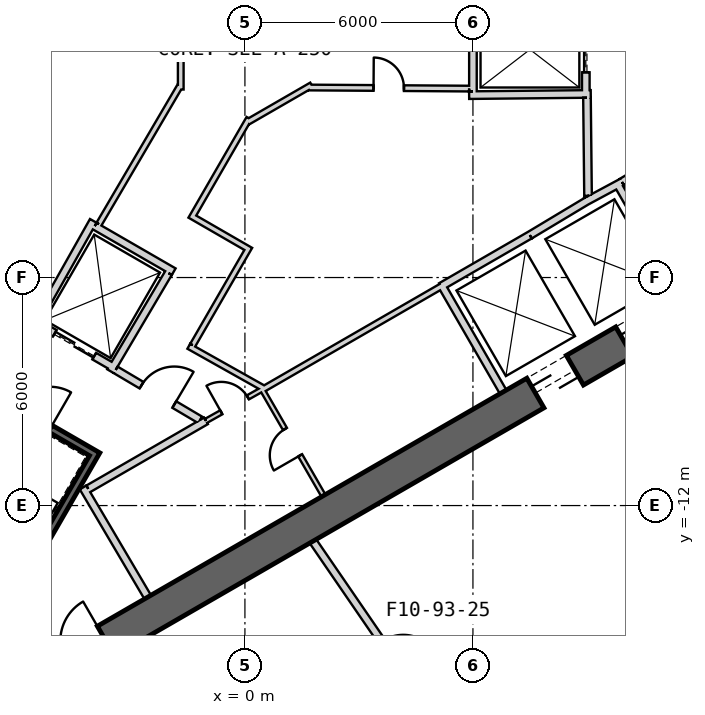
"""IFC4 building model, lengths in metres.
Left out: names, types, materials, properties, quantities, classifications, styles, units other than length and angle.
Written with IfcOpenShell. Run it as: python <this file> out.ifc"""

import sys

from ifc_helpers import new_model, si_unit, direction, frame, frame_2d, origin, place, context, subcontext, project, spatial, rectangle, extrude, element, fill, save


model = new_model("IFC4")
c1 = context("Model", 3, precision=1e-05, world=origin(), true_north=direction((0.0, 1.0)))
c2 = subcontext(c1, "Body", "Model", "MODEL_VIEW")
j1 = project(units=[si_unit("LENGTHUNIT", "METRE"), si_unit("PLANEANGLEUNIT", "RADIAN")], contexts=[c1])
p1 = place(None, origin())
s1 = spatial("IfcSite", under=j1, at=p1, CompositionType="ELEMENT")
p2 = place(p1, origin())
s2 = spatial("IfcBuilding", under=s1, at=p2, CompositionType="ELEMENT")
p3 = place(p2, frame((0.0, 0.0, 410.3)))
s3 = spatial("IfcBuildingStorey", under=s2, at=p3, CompositionType="ELEMENT", Elevation=410.3)
p4 = place(p3, frame((-7.825, -17.97, 0.0), z_axis=(0.0, 0.0, 1.0), x_axis=(0.866028369851, 0.499994862586, 0.0)))
e1 = element("IfcWall", 1, at=p4, inside=s3, PredefinedType="SHEAR", context=c2, shape_type="SweptSolid", body=[
    extrude(rectangle(XDim=31.523, YDim=0.9, at=frame_2d((15.762, 0.0))), origin(), (0.0, 0.0, 1.0), 5.0),
])
p5 = place(p4, frame((17.862, 0.0, 0.0)))
e2 = element("IfcOpeningElement", 2, at=p5, cuts=e1, PredefinedType="OPENING", context=c2, shape_type="SweptSolid", body=[
    extrude(rectangle(XDim=1.2, YDim=2.4, at=frame_2d((0.6, 1.2))), frame((0.0, 0.46, 0.0), z_axis=(0.0, -1.0, 0.0), x_axis=(1.0, 0.0, 0.0)), (0.0, 0.0, 1.0), 0.92),
])
p6 = place(p4, frame((20.562, 0.0, 0.0)))
e3 = element("IfcOpeningElement", 3, at=p6, cuts=e1, PredefinedType="OPENING", context=c2, shape_type="SweptSolid", body=[
    extrude(rectangle(XDim=1.2, YDim=2.4, at=frame_2d((0.6, 1.2))), frame((0.0, 0.46, 0.0), z_axis=(0.0, -1.0, 0.0), x_axis=(1.0, 0.0, 0.0)), (0.0, 0.0, 1.0), 0.92),
])
p7 = place(p4, frame((26.712, 0.0, 0.0)))
e4 = element("IfcOpeningElement", 4, at=p7, cuts=e1, PredefinedType="OPENING", context=c2, shape_type="SweptSolid", body=[
    extrude(rectangle(XDim=1.2, YDim=2.4, at=frame_2d((0.6, 1.2))), frame((0.0, 0.46, 0.0), z_axis=(0.0, -1.0, 0.0), x_axis=(1.0, 0.0, 0.0)), (0.0, 0.0, 1.0), 0.92),
])
p8 = place(p4, frame((3.612, 0.0, 0.0)))
e5 = element("IfcOpeningElement", 5, at=p8, cuts=e1, PredefinedType="OPENING", context=c2, shape_type="SweptSolid", body=[
    extrude(rectangle(XDim=1.2, YDim=2.4, at=frame_2d((0.6, 1.2))), frame((0.0, 0.46, 0.0), z_axis=(0.0, -1.0, 0.0), x_axis=(1.0, 0.0, 0.0)), (0.0, 0.0, 1.0), 0.92),
])
p9 = place(p3, frame((-1.186, -23.926, 0.0), z_axis=(0.0, 0.0, 1.0), x_axis=(0.824480875731, 0.565889817503, 0.0)))
e6 = element("IfcWall", 6, at=p9, inside=s3, PredefinedType="SOLIDWALL", context=c2, shape_type="SweptSolid", body=[
    extrude(rectangle(XDim=26.064, YDim=0.24, at=frame_2d((13.032, 0.0))), origin(), (0.0, 0.0, 1.0), 4.75),
])
p10 = place(p3, frame((21.34, -9.818, 0.04), z_axis=(0.0, 0.0, 1.0), x_axis=(-0.82447788812, -0.565894170319, 0.0)))
e7 = element("IfcWall", 7, at=p10, inside=s3, PredefinedType="PARAPET", context=c2, shape_type="SweptSolid", body=[
    extrude(rectangle(XDim=27.207, YDim=0.25, at=frame_2d((13.603, 0.0))), origin(), (0.0, 0.0, 1.0), 1.2),
])
p11 = place(p3, frame((20.588, -9.667, 0.04), z_axis=(0.0, 0.0, 1.0), x_axis=(-0.824474055668, -0.565899753958, 0.0)))
e8 = element("IfcWall", 8, at=p11, inside=s3, PredefinedType="PARAPET", context=c2, shape_type="SweptSolid", body=[
    extrude(rectangle(XDim=26.031, YDim=0.5, at=frame_2d((13.016, 0.0))), origin(), (0.0, 0.0, 1.0), 0.6),
])
p12 = place(p3, frame((6.795, -9.01, 0.0), z_axis=(0.0, 0.0, 1.0), x_axis=(-0.499984717929, 0.866034226713, 0.0)))
e9 = element("IfcWall", 9, at=p12, inside=s3, PredefinedType="PLUMBINGWALL", context=c2, shape_type="SweptSolid", body=[
    extrude(rectangle(XDim=3.25, YDim=0.2, at=frame_2d((1.625, 0.0))), origin(), (0.0, 0.0, 1.0), 4.75),
])
p13 = place(p3, frame((5.159, -6.236, 0.0), z_axis=(0.0, 0.0, 1.0), x_axis=(0.866036505625, 0.499980770555, 0.0)))
e10 = element("IfcWall", 10, at=p13, inside=s3, PredefinedType="PLUMBINGWALL", context=c2, shape_type="SweptSolid", body=[
    extrude(rectangle(XDim=2.7, YDim=0.2, at=frame_2d((1.35, 0.0))), origin(), (0.0, 0.0, 1.0), 4.75),
])
p14 = place(p3, frame((9.795, -3.525, 0.0), z_axis=(0.0, 0.0, 1.0), x_axis=(0.499984717929, -0.866034226713, 0.0)))
e11 = element("IfcWall", 11, at=p14, inside=s3, PredefinedType="PLUMBINGWALL", context=c2, shape_type="SweptSolid", body=[
    extrude(rectangle(XDim=3.25, YDim=0.2, at=frame_2d((1.625, 0.0))), origin(), (0.0, 0.0, 1.0), 4.75),
])
p15 = place(p3, frame((8.974, -3.999, 0.0), z_axis=(0.0, 0.0, 1.0), x_axis=(0.880907015104, 0.473289373154, 0.0)))
e12 = element("IfcWall", 12, at=p15, inside=s3, PredefinedType="PLUMBINGWALL", context=c2, shape_type="SweptSolid", body=[
    extrude(rectangle(XDim=1.078, YDim=0.2, at=frame_2d((0.539, 0.0))), origin(), (0.0, 0.0, 1.0), 4.75),
])
p16 = place(p3, frame((7.497, -4.886, 0.0), z_axis=(0.0, 0.0, 1.0), x_axis=(0.857516281273, 0.51445682749, 0.0)))
e13 = element("IfcWall", 13, at=p16, inside=s3, PredefinedType="PLUMBINGWALL", context=c2, shape_type="SweptSolid", body=[
    extrude(rectangle(XDim=1.845, YDim=0.2, at=frame_2d((0.922, 0.0))), origin(), (0.0, 0.0, 1.0), 4.75),
])
p17 = place(p3, frame((8.97, 1.2, 0.0), z_axis=(0.0, 0.0, 1.0), x_axis=(0.0, -1.0, 0.0)))
e14 = element("IfcWall", 14, at=p17, inside=s3, PredefinedType="PLUMBINGWALL", context=c2, shape_type="SweptSolid", body=[
    extrude(rectangle(XDim=2.4, YDim=0.2, at=frame_2d((1.2, 0.0))), origin(), (0.0, 0.0, 1.0), 4.75),
])
p18 = place(p17, frame((0.6, 0.0, 0.0)))
e15 = element("IfcOpeningElement", 15, at=p18, cuts=e14, PredefinedType="OPENING", context=c2, shape_type="SweptSolid", body=[
    extrude(rectangle(XDim=1.2, YDim=2.4, at=frame_2d((0.6, 1.2))), frame((0.0, 0.11, 0.0), z_axis=(0.0, -1.0, 0.0), x_axis=(1.0, 0.0, 0.0)), (0.0, 0.0, 1.0), 0.22),
])
p19 = place(p3, frame((9.1, -1.169, 0.0), z_axis=(0.0, 0.0, 1.0), x_axis=(-0.999950064753, -0.009993397809, 0.0)))
e16 = element("IfcWall", 16, at=p19, inside=s3, PredefinedType="PLUMBINGWALL", context=c2, shape_type="SweptSolid", body=[
    extrude(rectangle(XDim=3.2, YDim=0.2, at=frame_2d((1.6, 0.0))), origin(), (0.0, 0.0, 1.0), 4.75),
])
p20 = place(p3, frame((6.0, -1.1, 0.0), z_axis=(0.0, 0.0, 1.0), x_axis=(0.0, 1.0, 0.0)))
e17 = element("IfcWall", 17, at=p20, inside=s3, PredefinedType="PLUMBINGWALL", context=c2, shape_type="SweptSolid", body=[
    extrude(rectangle(XDim=2.4, YDim=0.2, at=frame_2d((1.2, 0.0))), origin(), (0.0, 0.0, 1.0), 4.75),
])
p21 = place(p3, frame((-3.905, -10.563, -0.25), z_axis=(0.0, 0.0, 1.0), x_axis=(-0.500012932018, -0.866017937352, 0.0)))
e18 = element("IfcWall", 18, at=p21, inside=s3, PredefinedType="SHEAR", context=c2, shape_type="SweptSolid", body=[
    extrude(rectangle(XDim=8.1, YDim=0.2, at=frame_2d((4.05, 0.0))), origin(), (0.0, 0.0, 1.0), 5.0),
])
p22 = place(p3, frame((-4.041, -10.599, -0.25), z_axis=(0.0, 0.0, 1.0), x_axis=(-0.866047807691, 0.499961193289, 0.0)))
e19 = element("IfcWall", 19, at=p22, inside=s3, PredefinedType="SHEAR", context=c2, shape_type="SweptSolid", body=[
    extrude(rectangle(XDim=3.6, YDim=0.2, at=frame_2d((1.8, 0.0))), origin(), (0.0, 0.0, 1.0), 5.0),
])
p23 = place(p22, frame((1.25, 0.0, 0.25)))
e20 = element("IfcOpeningElement", 20, at=p23, cuts=e19, PredefinedType="OPENING", context=c2, shape_type="SweptSolid", body=[
    extrude(rectangle(XDim=1.1, YDim=2.1, at=frame_2d((0.55, 1.05))), frame((0.0, 0.11, 0.0), z_axis=(0.0, -1.0, 0.0), x_axis=(1.0, 0.0, 0.0)), (0.0, 0.0, 1.0), 0.22),
])
p24 = place(p3, frame((-3.446, -8.368, 0.0), z_axis=(0.0, 0.0, 1.0), x_axis=(-0.866024647952, 0.500001309137, 0.0)))
e21 = element("IfcWall", 21, at=p24, inside=s3, PredefinedType="PLUMBINGWALL", context=c2, shape_type="SweptSolid", body=[
    extrude(rectangle(XDim=2.4, YDim=0.2, at=frame_2d((1.2, 0.0))), origin(), (0.0, 0.0, 1.0), 4.75),
])
p25 = place(p24, frame((0.6, 0.0, 0.0)))
e22 = element("IfcOpeningElement", 22, at=p25, cuts=e21, PredefinedType="OPENING", context=c2, shape_type="SweptSolid", body=[
    extrude(rectangle(XDim=1.2, YDim=2.4, at=frame_2d((0.6, 1.2))), frame((0.0, 0.11, 0.0), z_axis=(0.0, -1.0, 0.0), x_axis=(1.0, 0.0, 0.0)), (0.0, 0.0, 1.0), 0.22),
])
p26 = place(p3, frame((-5.562, -7.296, 0.0), z_axis=(0.0, 0.0, 1.0), x_axis=(0.491358283181, 0.870957540612, 0.0)))
e23 = element("IfcWall", 23, at=p26, inside=s3, PredefinedType="PLUMBINGWALL", context=c2, shape_type="SweptSolid", body=[
    extrude(rectangle(XDim=3.2, YDim=0.2, at=frame_2d((1.6, 0.0))), origin(), (0.0, 0.0, 1.0), 4.75),
])
p27 = place(p3, frame((-3.953, -4.646, 0.0), z_axis=(0.0, 0.0, 1.0), x_axis=(0.866024647952, -0.500001309137, 0.0)))
e24 = element("IfcWall", 24, at=p27, inside=s3, PredefinedType="PLUMBINGWALL", context=c2, shape_type="SweptSolid", body=[
    extrude(rectangle(XDim=2.4, YDim=0.2, at=frame_2d((1.2, 0.0))), origin(), (0.0, 0.0, 1.0), 4.75),
])
p28 = place(p3, frame((-2.012, -5.882, 0.0), z_axis=(0.0, 0.0, 1.0), x_axis=(-0.508619639323, -0.860991325447, 0.0)))
e25 = element("IfcWall", 25, at=p28, inside=s3, PredefinedType="PLUMBINGWALL", context=c2, shape_type="SweptSolid", body=[
    extrude(rectangle(XDim=3.0, YDim=0.2, at=frame_2d((1.5, 0.0))), origin(), (0.0, 0.0, 1.0), 4.75),
])
p29 = place(p3, frame((2.067, -11.74, 0.0), z_axis=(0.0, 0.0, 1.0), x_axis=(-0.499984717929, 0.866034226713, 0.0)))
e26 = element("IfcWall", 26, at=p29, inside=s3, PredefinedType="PARTITIONING", context=c2, shape_type="SweptSolid", body=[
    extrude(rectangle(XDim=3.25, YDim=0.12, at=frame_2d((1.625, 0.0))), origin(), (0.0, 0.0, 1.0), 4.75),
])
p30 = place(p29, frame((1.225, 0.0, 0.0)))
e27 = element("IfcOpeningElement", 27, at=p30, cuts=e26, PredefinedType="OPENING", context=c2, shape_type="SweptSolid", body=[
    extrude(rectangle(XDim=0.8, YDim=2.1, at=frame_2d((0.4, 1.05))), frame((0.0, 0.07, 0.0), z_axis=(0.0, -1.0, 0.0), x_axis=(1.0, 0.0, 0.0)), (0.0, 0.0, 1.0), 0.14),
])
p31 = place(p3, frame((-4.26, -11.524, 0.0), z_axis=(0.0, 0.0, 1.0), x_axis=(0.507997497166, -0.861358544901, 0.0)))
e28 = element("IfcWall", 28, at=p31, inside=s3, PredefinedType="PARTITIONING", context=c2, shape_type="SweptSolid", body=[
    extrude(rectangle(XDim=3.35, YDim=0.2, at=frame_2d((1.675, 0.0))), origin(), (0.0, 0.0, 1.0), 4.75),
])
p32 = place(p3, frame((-1.024, -9.771, 0.0), z_axis=(0.0, 0.0, 1.0), x_axis=(-0.866029903013, -0.499992207027, 0.0)))
e29 = element("IfcWall", 29, at=p32, inside=s3, PredefinedType="PARTITIONING", context=c2, shape_type="SweptSolid", body=[
    extrude(rectangle(XDim=3.578, YDim=0.2, at=frame_2d((1.789, 0.0))), origin(), (0.0, 0.0, 1.0), 4.75),
])
p33 = place(p3, frame((0.478, -8.928, 0.0), z_axis=(0.0, 0.0, 1.0), x_axis=(-0.871968924608, -0.489561226527, 0.0)))
e30 = element("IfcWall", 30, at=p33, inside=s3, PredefinedType="PARTITIONING", context=c2, shape_type="SweptSolid", body=[
    extrude(rectangle(XDim=1.722, YDim=0.12, at=frame_2d((0.861, 0.0))), origin(), (0.0, 0.0, 1.0), 4.75),
])
p34 = place(p33, frame((0.461, 0.0, 0.0)))
e31 = element("IfcOpeningElement", 31, at=p34, cuts=e30, PredefinedType="OPENING", context=c2, shape_type="SweptSolid", body=[
    extrude(rectangle(XDim=0.8, YDim=2.1, at=frame_2d((0.4, 1.05))), frame((0.0, 0.07, 0.0), z_axis=(0.0, -1.0, 0.0), x_axis=(1.0, 0.0, 0.0)), (0.0, 0.0, 1.0), 0.14),
])
p35 = place(p3, frame((0.483, -8.936, 0.0), z_axis=(0.0, 0.0, 1.0), x_axis=(0.866028230842, 0.499995103361, 0.0)))
e32 = element("IfcWall", 32, at=p35, inside=s3, PredefinedType="PLUMBINGWALL", context=c2, shape_type="SweptSolid", body=[
    extrude(rectangle(XDim=5.4, YDim=0.15, at=frame_2d((2.7, 0.0))), origin(), (0.0, 0.0, 1.0), 4.75),
])
p36 = place(p3, frame((12.245, -2.109, 0.0), z_axis=(0.0, 0.0, 1.0), x_axis=(-0.860414880418, -0.509594185166, 0.0)))
e33 = element("IfcWall", 33, at=p36, inside=s3, PredefinedType="PARTITIONING", context=c2, shape_type="SweptSolid", body=[
    extrude(rectangle(XDim=2.7, YDim=0.2, at=frame_2d((1.35, 0.0))), origin(), (0.0, 0.0, 1.0), 4.75),
])
p37 = place(p3, frame((9.029, -3.851, 0.0), z_axis=(0.0, 0.0, 1.0), x_axis=(-0.010784614026, 0.999941844359, 0.0)))
e34 = element("IfcWall", 34, at=p37, inside=s3, PredefinedType="PARTITIONING", context=c2, shape_type="SweptSolid", body=[
    extrude(rectangle(XDim=2.581, YDim=0.2, at=frame_2d((1.291, 0.0))), origin(), (0.0, 0.0, 1.0), 4.75),
])
p38 = place(p3, frame((-3.401, -8.43, 0.0), z_axis=(0.0, 0.0, 1.0), x_axis=(0.860630814782, -0.509229418482, 0.0)))
e35 = element("IfcWall", 35, at=p38, inside=s3, PredefinedType="PARTITIONING", context=c2, shape_type="SweptSolid", body=[
    extrude(rectangle(XDim=2.582, YDim=0.2, at=frame_2d((1.291, 0.0))), origin(), (0.0, 0.0, 1.0), 4.75),
])
p39 = place(p38, frame((0.791, 0.0, 0.0)))
e36 = element("IfcOpeningElement", 36, at=p39, cuts=e35, PredefinedType="OPENING", context=c2, shape_type="SweptSolid", body=[
    extrude(rectangle(XDim=1.0, YDim=2.1, at=frame_2d((0.5, 1.05))), frame((0.0, 0.11, 0.0), z_axis=(0.0, -1.0, 0.0), x_axis=(1.0, 0.0, 0.0)), (0.0, 0.0, 1.0), 0.22),
])
p40 = place(p3, frame((-1.689, -1.053, 0.0), z_axis=(0.0, 0.0, 1.0), x_axis=(0.0, 1.0, 0.0)))
e37 = element("IfcWall", 37, at=p40, inside=s3, PredefinedType="PLUMBINGWALL", context=c2, shape_type="SweptSolid", body=[
    extrude(rectangle(XDim=1.954, YDim=0.15, at=frame_2d((0.977, 0.0))), origin(), (0.0, 0.0, 1.0), 4.75),
])
p41 = place(p3, frame((-3.841, -4.595, 0.0), z_axis=(0.0, 0.0, 1.0), x_axis=(0.505857207696, 0.862617229959, 0.0)))
e38 = element("IfcWall", 38, at=p41, inside=s3, PredefinedType="PLUMBINGWALL", context=c2, shape_type="SweptSolid", body=[
    extrude(rectangle(XDim=4.231, YDim=0.15, at=frame_2d((2.116, 0.0))), origin(), (0.0, 0.0, 1.0), 4.75),
])
p42 = place(p3, frame((-1.477, -7.808, 0.0), z_axis=(0.0, 0.0, 1.0), x_axis=(0.871822901869, -0.48982122022, 0.0)))
e39 = element("IfcWall", 39, at=p42, inside=s3, PredefinedType="PLUMBINGWALL", context=c2, shape_type="SweptSolid", body=[
    extrude(rectangle(XDim=2.24, YDim=0.15, at=frame_2d((1.12, 0.0))), origin(), (0.0, 0.0, 1.0), 4.75),
])
p43 = place(p3, frame((0.126, -5.182, 0.0), z_axis=(0.0, 0.0, 1.0), x_axis=(-0.499990139034, -0.866031096941, 0.0)))
e40 = element("IfcWall", 40, at=p43, inside=s3, PredefinedType="PLUMBINGWALL", context=c2, shape_type="SweptSolid", body=[
    extrude(rectangle(XDim=3.0, YDim=0.15, at=frame_2d((1.5, 0.0))), origin(), (0.0, 0.0, 1.0), 4.75),
])
p44 = place(p3, frame((-1.449, -4.36, 0.0), z_axis=(0.0, 0.0, 1.0), x_axis=(0.866025371046, -0.500000056704, 0.0)))
e41 = element("IfcWall", 41, at=p44, inside=s3, PredefinedType="PLUMBINGWALL", context=c2, shape_type="SweptSolid", body=[
    extrude(rectangle(XDim=1.7, YDim=0.15, at=frame_2d((0.85, 0.0))), origin(), (0.0, 0.0, 1.0), 4.75),
])
p45 = place(p3, frame((0.108, -1.812, 0.0), z_axis=(0.0, 0.0, 1.0), x_axis=(-0.49994762993, -0.866055637547, 0.0)))
e42 = element("IfcWall", 42, at=p45, inside=s3, PredefinedType="PLUMBINGWALL", context=c2, shape_type="SweptSolid", body=[
    extrude(rectangle(XDim=2.909, YDim=0.15, at=frame_2d((1.455, 0.0))), origin(), (0.0, 0.0, 1.0), 4.75),
])
p46 = place(p3, frame((1.756, -0.936, 0.0), z_axis=(0.0, 0.0, 1.0), x_axis=(-0.86601293162, -0.5000216018, 0.0)))
e43 = element("IfcWall", 43, at=p46, inside=s3, PredefinedType="PLUMBINGWALL", context=c2, shape_type="SweptSolid", body=[
    extrude(rectangle(XDim=1.955, YDim=0.15, at=frame_2d((0.977, 0.0))), origin(), (0.0, 0.0, 1.0), 4.75),
])
p47 = place(p3, frame((5.9, -1.029, 0.0), z_axis=(0.0, 0.0, 1.0), x_axis=(-0.999977210765, 0.00675114447, 0.0)))
e44 = element("IfcWall", 44, at=p47, inside=s3, PredefinedType="PLUMBINGWALL", context=c2, shape_type="SweptSolid", body=[
    extrude(rectangle(XDim=4.231, YDim=0.15, at=frame_2d((2.115, 0.0))), origin(), (0.0, 0.0, 1.0), 4.75),
])
p48 = place(p47, frame((1.716, 0.0, 0.0)))
e45 = element("IfcOpeningElement", 45, at=p48, cuts=e44, PredefinedType="OPENING", context=c2, shape_type="SweptSolid", body=[
    extrude(rectangle(XDim=0.8, YDim=2.1, at=frame_2d((0.4, 1.05))), frame((0.0, 0.085, 0.0), z_axis=(0.0, -1.0, 0.0), x_axis=(1.0, 0.0, 0.0)), (0.0, 0.0, 1.0), 0.17),
])
p49 = place(p3, frame((1.79, -12.938, 0.0), z_axis=(0.0, 0.0, 1.0), x_axis=(0.565855513997, -0.824504419199, 0.0)))
e46 = element("IfcWall", 46, at=p49, inside=s3, PredefinedType="PARTITIONING", context=c2, shape_type="SweptSolid", body=[
    extrude(rectangle(XDim=7.25, YDim=0.2, at=frame_2d((3.625, 0.0))), origin(), (0.0, 0.0, 1.0), 4.75),
])
p50 = place(p49, frame((3.2, 0.0, 0.0)))
e47 = element("IfcOpeningElement", 47, at=p50, cuts=e46, PredefinedType="OPENING", context=c2, shape_type="SweptSolid", body=[
    extrude(rectangle(XDim=1.0, YDim=2.1, at=frame_2d((0.5, 1.05))), frame((0.0, 0.11, 0.0), z_axis=(0.0, -1.0, 0.0), x_axis=(1.0, 0.0, 0.0)), (0.0, 0.0, 1.0), 0.22),
])
p51 = place(p18, origin())
e48 = element("IfcDoor", 48, at=p51, inside=s3, OperationType="SLIDING_TO_LEFT", PredefinedType="USERDEFINED", context=c2, shape_type="SweptSolid", body=[
    extrude(rectangle(XDim=1.2, YDim=2.4, at=frame_2d((0.6, 1.2))), frame((0.0, 0.025, 0.0), z_axis=(0.0, -1.0, 0.0), x_axis=(1.0, 0.0, 0.0)), (0.0, 0.0, 1.0), 0.05),
])
fill(e15, e48)
p52 = place(p39, origin())
e49 = element("IfcDoor", 49, at=p52, inside=s3, OperationType="SINGLE_SWING_RIGHT", PredefinedType="USERDEFINED", context=c2, shape_type="SweptSolid", body=[
    extrude(rectangle(XDim=1.0, YDim=2.1, at=frame_2d((0.5, 1.05))), frame((0.0, 0.025, 0.0), z_axis=(0.0, -1.0, 0.0), x_axis=(1.0, 0.0, 0.0)), (0.0, 0.0, 1.0), 0.05),
])
fill(e36, e49)
p53 = place(p25, origin())
e50 = element("IfcDoor", 50, at=p53, inside=s3, OperationType="SLIDING_TO_LEFT", PredefinedType="USERDEFINED", context=c2, shape_type="SweptSolid", body=[
    extrude(rectangle(XDim=1.2, YDim=2.4, at=frame_2d((0.6, 1.2))), frame((0.0, 0.025, 0.0), z_axis=(0.0, -1.0, 0.0), x_axis=(1.0, 0.0, 0.0)), (0.0, 0.0, 1.0), 0.05),
])
fill(e22, e50)
p54 = place(p48, origin())
e51 = element("IfcDoor", 51, at=p54, inside=s3, OperationType="SINGLE_SWING_RIGHT", PredefinedType="USERDEFINED", context=c2, shape_type="SweptSolid", body=[
    extrude(rectangle(XDim=0.8, YDim=2.1, at=frame_2d((0.4, 1.05))), frame((0.0, 0.025, 0.0), z_axis=(0.0, -1.0, 0.0), x_axis=(1.0, 0.0, 0.0)), (0.0, 0.0, 1.0), 0.05),
])
fill(e45, e51)
p55 = place(p34, origin())
e52 = element("IfcDoor", 52, at=p55, inside=s3, OperationType="SINGLE_SWING_RIGHT", PredefinedType="USERDEFINED", context=c2, shape_type="SweptSolid", body=[
    extrude(rectangle(XDim=0.8, YDim=2.1, at=frame_2d((0.4, 1.05))), frame((0.0, 0.025, 0.0), z_axis=(0.0, -1.0, 0.0), x_axis=(1.0, 0.0, 0.0)), (0.0, 0.0, 1.0), 0.05),
])
fill(e31, e52)
p56 = place(p30, origin())
e53 = element("IfcDoor", 53, at=p56, inside=s3, OperationType="SINGLE_SWING_LEFT", PredefinedType="USERDEFINED", context=c2, shape_type="SweptSolid", body=[
    extrude(rectangle(XDim=0.8, YDim=2.1, at=frame_2d((0.4, 1.05))), frame((0.0, 0.025, 0.0), z_axis=(0.0, -1.0, 0.0), x_axis=(1.0, 0.0, 0.0)), (0.0, 0.0, 1.0), 0.05),
])
fill(e27, e53)
p57 = place(p5, origin())
e54 = element("IfcDoor", 54, at=p57, inside=s3, OperationType="SLIDING_TO_LEFT", PredefinedType="USERDEFINED", context=c2, shape_type="SweptSolid", body=[
    extrude(rectangle(XDim=1.2, YDim=2.4, at=frame_2d((0.6, 1.2))), frame((0.0, 0.025, 0.0), z_axis=(0.0, -1.0, 0.0), x_axis=(1.0, 0.0, 0.0)), (0.0, 0.0, 1.0), 0.05),
])
fill(e2, e54)
p58 = place(p6, origin())
e55 = element("IfcDoor", 55, at=p58, inside=s3, OperationType="SLIDING_TO_LEFT", PredefinedType="USERDEFINED", context=c2, shape_type="SweptSolid", body=[
    extrude(rectangle(XDim=1.2, YDim=2.4, at=frame_2d((0.6, 1.2))), frame((0.0, 0.025, 0.0), z_axis=(0.0, -1.0, 0.0), x_axis=(1.0, 0.0, 0.0)), (0.0, 0.0, 1.0), 0.05),
])
fill(e3, e55)
save(model, sys.argv[1])
